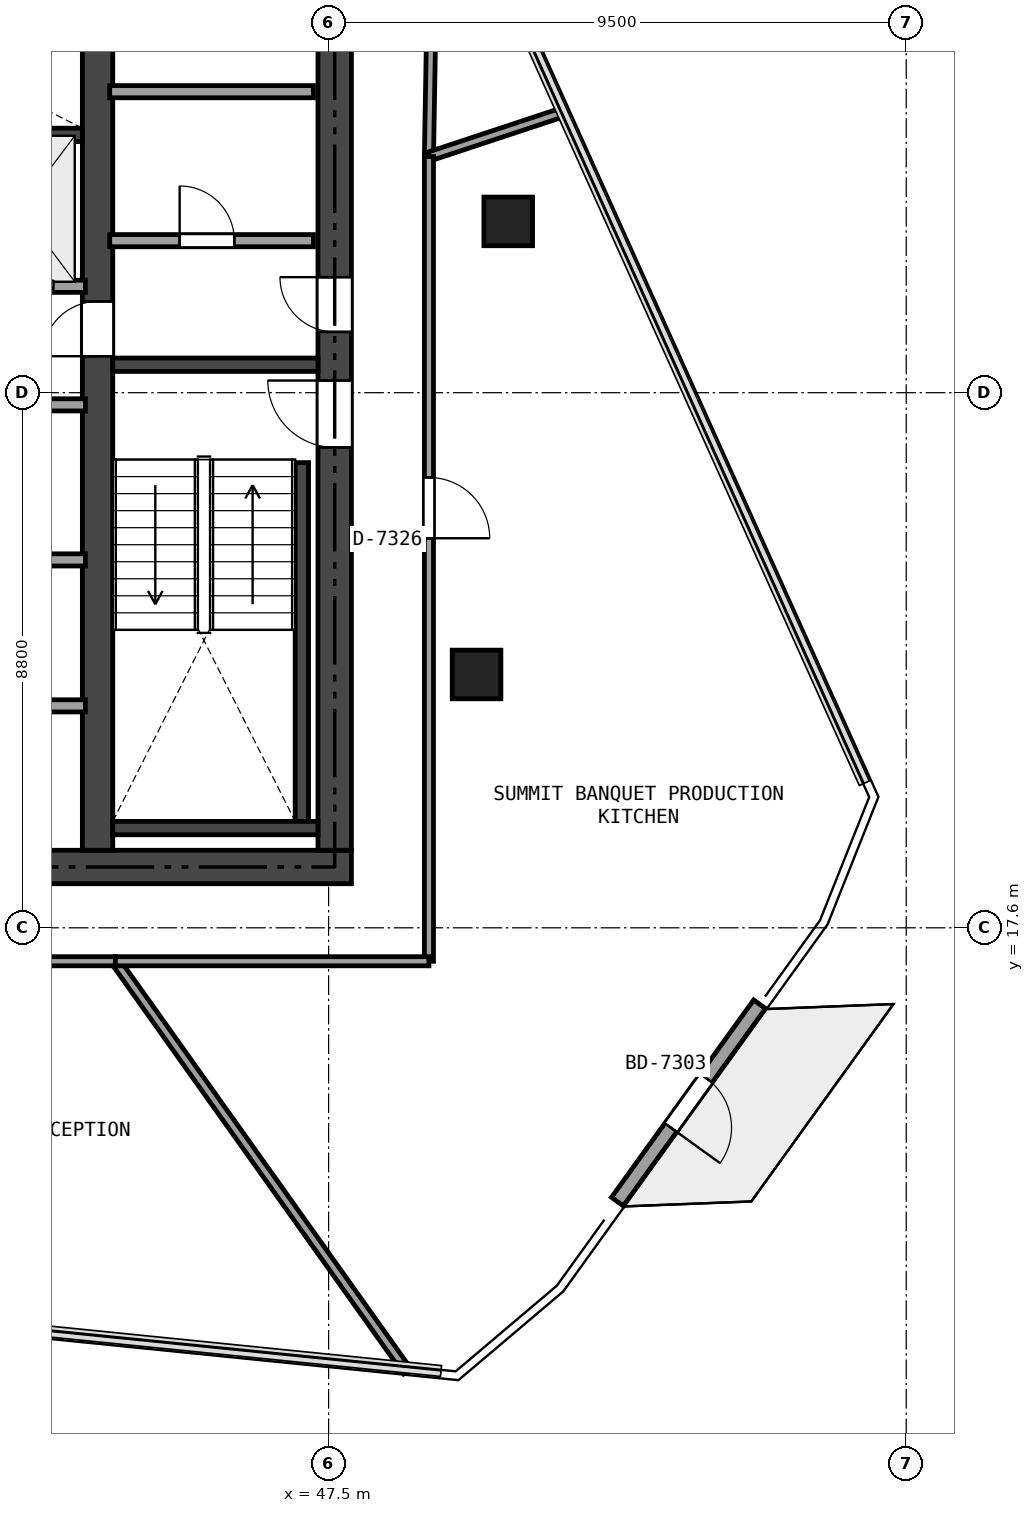
"""IFC4 building model, lengths in metres.
Left out: names, types, materials, properties, quantities, classifications, styles, units other than length and angle.
Written with IfcOpenShell. Run it as: python <this file> out.ifc"""

import sys

from ifc_helpers import new_model, si_unit, direction, frame, frame_2d, origin, origin_2d, place, context, subcontext, project, spatial, rectangle, extrude, element, fill, save


model = new_model("IFC4")
c1 = context("Model", 3, precision=1e-05, world=origin(), true_north=direction((0.0, 1.0)))
c2 = subcontext(c1, "Body", "Model", "MODEL_VIEW")
j1 = project(units=[si_unit("LENGTHUNIT", "METRE"), si_unit("PLANEANGLEUNIT", "RADIAN")], contexts=[c1])
p1 = place(None, origin())
s1 = spatial("IfcSite", under=j1, at=p1, CompositionType="ELEMENT")
p2 = place(p1, origin())
s2 = spatial("IfcBuilding", under=s1, at=p2, CompositionType="ELEMENT")
p3 = place(p2, frame((0.0, 0.0, 271.5)))
s3 = spatial("IfcBuildingStorey", under=s2, at=p3, CompositionType="ELEMENT", Elevation=271.5)
p4 = place(p3, frame((26.525, 18.6, 0.0), z_axis=(0.0, 0.0, 1.0), x_axis=(1.0, 0.0, 0.0)))
e1 = element("IfcWall", 1, at=p4, inside=s3, PredefinedType="SHEAR", context=c2, shape_type="SweptSolid", body=[
    extrude(rectangle(XDim=21.35, YDim=0.55, at=frame_2d((10.675, 0.0))), origin(), (0.0, 0.0, 1.0), 3.32),
])
p5 = place(p4, frame((12.4, 0.0, 0.0)))
e2 = element("IfcOpeningElement", 2, at=p5, cuts=e1, PredefinedType="OPENING", context=c2, shape_type="SweptSolid", body=[
    extrude(rectangle(XDim=1.15, YDim=2.15, at=frame_2d((0.575, 1.075))), frame((0.0, 0.285, 0.0), z_axis=(0.0, -1.0, 0.0), x_axis=(1.0, 0.0, 0.0)), (0.0, 0.0, 1.0), 0.57),
])
p6 = place(p4, frame((5.225, 0.0, 0.0)))
e3 = element("IfcOpeningElement", 3, at=p6, cuts=e1, PredefinedType="OPENING", context=c2, shape_type="SweptSolid", body=[
    extrude(rectangle(XDim=0.9, YDim=2.1, at=frame_2d((0.45, 1.05))), frame((0.0, 0.285, 0.0), z_axis=(0.0, -1.0, 0.0), x_axis=(1.0, 0.0, 0.0)), (0.0, 0.0, 1.0), 0.57),
])
p7 = place(p3, frame((47.6, 18.875, 0.0), z_axis=(0.0, 0.0, 1.0), x_axis=(0.0, 1.0, 0.0)))
e4 = element("IfcWall", 4, at=p7, inside=s3, PredefinedType="SHEAR", context=c2, shape_type="SweptSolid", body=[
    extrude(rectangle(XDim=15.05, YDim=0.55, at=frame_2d((7.525, 0.0))), origin(), (0.0, 0.0, 1.0), 3.32),
])
p8 = place(p7, frame((6.625, 0.0, 0.0)))
e5 = element("IfcOpeningElement", 5, at=p8, cuts=e4, PredefinedType="OPENING", context=c2, shape_type="SweptSolid", body=[
    extrude(rectangle(XDim=1.1, YDim=2.15, at=frame_2d((0.55, 1.075))), frame((0.0, 0.285, 0.0), z_axis=(0.0, -1.0, 0.0), x_axis=(1.0, 0.0, 0.0)), (0.0, 0.0, 1.0), 0.57),
])
p9 = place(p7, frame((8.525, 0.0, 0.0)))
e6 = element("IfcOpeningElement", 6, at=p9, cuts=e4, PredefinedType="OPENING", context=c2, shape_type="SweptSolid", body=[
    extrude(rectangle(XDim=0.9, YDim=2.1, at=frame_2d((0.45, 1.05))), frame((0.0, 0.285, 0.0), z_axis=(0.0, -1.0, 0.0), x_axis=(1.0, 0.0, 0.0)), (0.0, 0.0, 1.0), 0.57),
])
p10 = place(p7, frame((13.175, 0.0, 0.0)))
e7 = element("IfcOpeningElement", 7, at=p10, cuts=e4, PredefinedType="OPENING", context=c2, shape_type="SweptSolid", body=[
    extrude(rectangle(XDim=0.9, YDim=2.1, at=frame_2d((0.45, 1.05))), frame((0.0, 0.285, 0.0), z_axis=(0.0, -1.0, 0.0), x_axis=(1.0, 0.0, 0.0)), (0.0, 0.0, 1.0), 0.57),
])
p11 = place(p3, frame((43.7, 18.875, 0.0), z_axis=(0.0, 0.0, 1.0), x_axis=(0.0, 1.0, 0.0)))
e8 = element("IfcWall", 8, at=p11, inside=s3, PredefinedType="SHEAR", context=c2, shape_type="SweptSolid", body=[
    extrude(rectangle(XDim=15.05, YDim=0.5, at=frame_2d((7.525, 0.0))), origin(), (0.0, 0.0, 1.0), 3.32),
])
p12 = place(p11, frame((8.125, 0.0, 0.0)))
e9 = element("IfcOpeningElement", 9, at=p12, cuts=e8, PredefinedType="OPENING", context=c2, shape_type="SweptSolid", body=[
    extrude(rectangle(XDim=0.9, YDim=2.1, at=frame_2d((0.45, 1.05))), frame((0.0, 0.26, 0.0), z_axis=(0.0, -1.0, 0.0), x_axis=(1.0, 0.0, 0.0)), (0.0, 0.0, 1.0), 0.52),
])
p13 = place(p3, frame((43.95, 26.86, 0.0), z_axis=(0.0, 0.0, 1.0), x_axis=(1.0, 0.0, 0.0)))
e10 = element("IfcWall", 10, at=p13, inside=s3, PredefinedType="SHEAR", context=c2, shape_type="SweptSolid", body=[
    extrude(rectangle(XDim=3.375, YDim=0.22, at=frame_2d((1.688, 0.0))), origin(), (0.0, 0.0, 1.0), 3.32),
])
p14 = place(p3, frame((47.06, 19.35, 0.0), z_axis=(0.0, 0.0, 1.0), x_axis=(0.0, 1.0, 0.0)))
e11 = element("IfcWall", 11, at=p14, inside=s3, PredefinedType="SHEAR", context=c2, shape_type="SweptSolid", body=[
    extrude(rectangle(XDim=5.9, YDim=0.22, at=frame_2d((2.95, 0.0))), origin(), (0.0, 0.0, 1.0), 3.32),
])
p15 = place(p3, frame((43.95, 19.24, 0.0), z_axis=(0.0, 0.0, 1.0), x_axis=(1.0, 0.0, 0.0)))
e12 = element("IfcWall", 12, at=p15, inside=s3, PredefinedType="SHEAR", context=c2, shape_type="SweptSolid", body=[
    extrude(rectangle(XDim=3.375, YDim=0.22, at=frame_2d((1.688, 0.0))), origin(), (0.0, 0.0, 1.0), 3.32),
])
p16 = place(p3, frame((35.84, 30.64, 0.0), z_axis=(0.0, 0.0, 1.0), x_axis=(1.0, 0.0, 0.0)))
e13 = element("IfcWall", 13, at=p16, inside=s3, PredefinedType="SHEAR", context=c2, shape_type="SweptSolid", body=[
    extrude(rectangle(XDim=7.61, YDim=0.22, at=frame_2d((3.805, 0.0))), origin(), (0.0, 0.0, 1.0), 3.32),
])
for number, where, z_axis, x_axis in (
    (14, (50.454, 29.217, 0.0), (0.0, 0.0, 1.0), (1.0, 0.0, 0.0)),
    (15, (49.933, 21.766, 0.0), (0.0, 0.0, 1.0), (1.0, 0.0, 0.0)),
):
    element("IfcColumn", number, at=place(p3, frame(where, z_axis=z_axis, x_axis=x_axis)), inside=s3, PredefinedType="COLUMN", context=c2, shape_type="SweptSolid", body=[
        extrude(rectangle(XDim=0.8, YDim=0.8, at=origin_2d()), origin(), (0.0, 0.0, 1.0), 3.32),
    ])
p17 = place(p3, frame((54.588, 16.343, 0.0), z_axis=(0.0, 0.0, 1.0), x_axis=(-0.584420476985, -0.811450988095, 0.0)))
e16 = element("IfcWall", 16, at=p17, inside=s3, PredefinedType="SOLIDWALL", context=c2, shape_type="SweptSolid", body=[
    extrude(rectangle(XDim=4.0, YDim=0.24, at=frame_2d((2.0, 0.0))), origin(), (0.0, 0.0, 1.0), 3.32),
])
p18 = place(p17, frame((1.5, 0.0, 0.0)))
e17 = element("IfcOpeningElement", 17, at=p18, cuts=e16, PredefinedType="OPENING", context=c2, shape_type="SweptSolid", body=[
    extrude(rectangle(XDim=1.0, YDim=2.15, at=frame_2d((0.5, 1.075))), frame((0.0, 0.13, 0.0), z_axis=(0.0, -1.0, 0.0), x_axis=(1.0, 0.0, 0.0)), (0.0, 0.0, 1.0), 0.26),
])
p19 = place(p3, frame((43.9, 28.9, 0.0), z_axis=(0.0, 0.0, 1.0), x_axis=(1.0, 0.0, 0.0)))
e18 = element("IfcWall", 18, at=p19, inside=s3, PredefinedType="SOLIDWALL", context=c2, shape_type="SweptSolid", body=[
    extrude(rectangle(XDim=3.35, YDim=0.2, at=frame_2d((1.675, 0.0))), origin(), (0.0, 0.0, 1.0), 3.32),
])
p20 = place(p19, frame((1.15, 0.0, 0.0)))
e19 = element("IfcOpeningElement", 19, at=p20, cuts=e18, PredefinedType="OPENING", context=c2, shape_type="SweptSolid", body=[
    extrude(rectangle(XDim=0.9, YDim=2.1, at=frame_2d((0.45, 1.05))), frame((0.0, 0.11, 0.0), z_axis=(0.0, -1.0, 0.0), x_axis=(1.0, 0.0, 0.0)), (0.0, 0.0, 1.0), 0.22),
])
p21 = place(p3, frame((43.9, 31.35, 0.0), z_axis=(0.0, 0.0, 1.0), x_axis=(1.0, 0.0, 0.0)))
e20 = element("IfcWall", 20, at=p21, inside=s3, PredefinedType="SOLIDWALL", context=c2, shape_type="SweptSolid", body=[
    extrude(rectangle(XDim=3.35, YDim=0.2, at=frame_2d((1.675, 0.0))), origin(), (0.0, 0.0, 1.0), 2.993),
])
p22 = place(p3, frame((35.62, 28.15, 0.0), z_axis=(0.0, 0.0, 1.0), x_axis=(1.0, 0.0, 0.0)))
e21 = element("IfcWall", 21, at=p22, inside=s3, PredefinedType="SOLIDWALL", context=c2, shape_type="SweptSolid", body=[
    extrude(rectangle(XDim=7.88, YDim=0.2, at=frame_2d((3.94, 0.0))), origin(), (0.0, 0.0, 1.0), 3.32),
])
p23 = place(p22, frame((0.405, 0.0, 0.0)))
e22 = element("IfcOpeningElement", 22, at=p23, cuts=e21, PredefinedType="OPENING", context=c2, shape_type="SweptSolid", body=[
    extrude(rectangle(XDim=1.1, YDim=2.15, at=frame_2d((0.55, 1.075))), frame((0.0, 0.11, 0.0), z_axis=(0.0, -1.0, 0.0), x_axis=(1.0, 0.0, 0.0)), (0.0, 0.0, 1.0), 0.22),
])
p24 = place(p22, frame((2.355, 0.0, 0.0)))
e23 = element("IfcOpeningElement", 23, at=p24, cuts=e21, PredefinedType="OPENING", context=c2, shape_type="SweptSolid", body=[
    extrude(rectangle(XDim=1.1, YDim=2.15, at=frame_2d((0.55, 1.075))), frame((0.0, 0.11, 0.0), z_axis=(0.0, -1.0, 0.0), x_axis=(1.0, 0.0, 0.0)), (0.0, 0.0, 1.0), 0.22),
])
p25 = place(p22, frame((4.305, 0.0, 0.0)))
e24 = element("IfcOpeningElement", 24, at=p25, cuts=e21, PredefinedType="OPENING", context=c2, shape_type="SweptSolid", body=[
    extrude(rectangle(XDim=1.1, YDim=2.15, at=frame_2d((0.55, 1.075))), frame((0.0, 0.11, 0.0), z_axis=(0.0, -1.0, 0.0), x_axis=(1.0, 0.0, 0.0)), (0.0, 0.0, 1.0), 0.22),
])
p26 = place(p22, frame((6.255, 0.0, 0.0)))
e25 = element("IfcOpeningElement", 25, at=p26, cuts=e21, PredefinedType="OPENING", context=c2, shape_type="SweptSolid", body=[
    extrude(rectangle(XDim=1.1, YDim=2.15, at=frame_2d((0.55, 1.075))), frame((0.0, 0.11, 0.0), z_axis=(0.0, -1.0, 0.0), x_axis=(1.0, 0.0, 0.0)), (0.0, 0.0, 1.0), 0.22),
])
p27 = place(p3, frame((35.62, 26.2, 0.0), z_axis=(0.0, 0.0, 1.0), x_axis=(1.0, 0.0, 0.0)))
e26 = element("IfcWall", 26, at=p27, inside=s3, PredefinedType="SOLIDWALL", context=c2, shape_type="SweptSolid", body=[
    extrude(rectangle(XDim=7.88, YDim=0.2, at=frame_2d((3.94, 0.0))), origin(), (0.0, 0.0, 1.0), 3.32),
])
p28 = place(p27, frame((1.13, 0.0, 0.0)))
e27 = element("IfcOpeningElement", 27, at=p28, cuts=e26, PredefinedType="OPENING", context=c2, shape_type="SweptSolid", body=[
    extrude(rectangle(XDim=0.9, YDim=2.1, at=frame_2d((0.45, 1.05))), frame((0.0, 0.11, 0.0), z_axis=(0.0, -1.0, 0.0), x_axis=(1.0, 0.0, 0.0)), (0.0, 0.0, 1.0), 0.22),
])
p29 = place(p27, frame((5.73, 0.0, 0.0)))
e28 = element("IfcOpeningElement", 28, at=p29, cuts=e26, PredefinedType="OPENING", context=c2, shape_type="SweptSolid", body=[
    extrude(rectangle(XDim=0.9, YDim=2.1, at=frame_2d((0.45, 1.05))), frame((0.0, 0.11, 0.0), z_axis=(0.0, -1.0, 0.0), x_axis=(1.0, 0.0, 0.0)), (0.0, 0.0, 1.0), 0.22),
])
p30 = place(p3, frame((35.62, 23.65, 0.0), z_axis=(0.0, 0.0, 1.0), x_axis=(1.0, 0.0, 0.0)))
e29 = element("IfcWall", 29, at=p30, inside=s3, PredefinedType="SOLIDWALL", context=c2, shape_type="SweptSolid", body=[
    extrude(rectangle(XDim=7.88, YDim=0.2, at=frame_2d((3.94, 0.0))), origin(), (0.0, 0.0, 1.0), 2.841),
])
p31 = place(p3, frame((35.62, 21.25, 0.0), z_axis=(0.0, 0.0, 1.0), x_axis=(1.0, 0.0, 0.0)))
e30 = element("IfcWall", 30, at=p31, inside=s3, PredefinedType="SOLIDWALL", context=c2, shape_type="SweptSolid", body=[
    extrude(rectangle(XDim=7.88, YDim=0.2, at=frame_2d((3.94, 0.0))), origin(), (0.0, 0.0, 1.0), 3.32),
])
p32 = place(p31, frame((1.13, 0.0, 0.0)))
e31 = element("IfcOpeningElement", 31, at=p32, cuts=e30, PredefinedType="OPENING", context=c2, shape_type="SweptSolid", body=[
    extrude(rectangle(XDim=0.9, YDim=2.1, at=frame_2d((0.45, 1.05))), frame((0.0, 0.11, 0.0), z_axis=(0.0, -1.0, 0.0), x_axis=(1.0, 0.0, 0.0)), (0.0, 0.0, 1.0), 0.22),
])
p33 = place(p31, frame((5.73, 0.0, 0.0)))
e32 = element("IfcOpeningElement", 32, at=p33, cuts=e30, PredefinedType="OPENING", context=c2, shape_type="SweptSolid", body=[
    extrude(rectangle(XDim=0.9, YDim=2.1, at=frame_2d((0.45, 1.05))), frame((0.0, 0.11, 0.0), z_axis=(0.0, -1.0, 0.0), x_axis=(1.0, 0.0, 0.0)), (0.0, 0.0, 1.0), 0.22),
])
p34 = place(p3, frame((49.245, 35.772, 0.0), z_axis=(0.0, 0.0, 1.0), x_axis=(-0.017343830358, -0.999849584462, 0.0)))
e33 = element("IfcWall", 33, at=p34, inside=s3, PredefinedType="PARTITIONING", context=c2, shape_type="SweptSolid", body=[
    extrude(rectangle(XDim=5.49, YDim=0.15, at=frame_2d((2.745, 0.0))), origin(), (0.0, 0.0, 1.0), 2.845),
])
p35 = place(p3, frame((49.15, 30.283, 0.0), z_axis=(0.0, 0.0, 1.0), x_axis=(0.949448945232, 0.313921487634, 0.0)))
e34 = element("IfcWall", 34, at=p35, inside=s3, PredefinedType="PARTITIONING", context=c2, shape_type="SweptSolid", body=[
    extrude(rectangle(XDim=2.351, YDim=0.15, at=frame_2d((1.176, 0.0))), origin(), (0.0, 0.0, 1.0), 2.845),
])
p36 = place(p3, frame((48.794, 10.306, 0.0), z_axis=(0.0, 0.0, 1.0), x_axis=(-0.579940250293, 0.814659012158, 0.0)))
e35 = element("IfcWall", 35, at=p36, inside=s3, PredefinedType="PARTITIONING", context=c2, shape_type="SweptSolid", body=[
    extrude(rectangle(XDim=8.279, YDim=0.15, at=frame_2d((4.139, 0.0))), origin(), (0.0, 0.0, 1.0), 2.845),
])
p37 = place(p3, frame((43.993, 17.05, 0.0), z_axis=(0.0, 0.0, 1.0), x_axis=(-1.0, 0.0, 0.0)))
e36 = element("IfcWall", 36, at=p37, inside=s3, PredefinedType="PARTITIONING", context=c2, shape_type="SweptSolid", body=[
    extrude(rectangle(XDim=13.586, YDim=0.15, at=frame_2d((6.793, 0.0))), origin(), (0.0, 0.0, 1.0), 2.769),
])
p38 = place(p37, frame((6.293, 0.0, 0.0)))
e37 = element("IfcOpeningElement", 37, at=p38, cuts=e36, PredefinedType="OPENING", context=c2, shape_type="SweptSolid", body=[
    extrude(rectangle(XDim=1.0, YDim=2.15, at=frame_2d((0.5, 1.075))), frame((0.0, 0.085, 0.0), z_axis=(0.0, -1.0, 0.0), x_axis=(1.0, 0.0, 0.0)), (0.0, 0.0, 1.0), 0.17),
])
p39 = place(p3, frame((49.15, 30.283, 0.0), z_axis=(0.0, 0.0, 1.0), x_axis=(0.0, -1.0, 0.0)))
e38 = element("IfcWall", 38, at=p39, inside=s3, PredefinedType="PARTITIONING", context=c2, shape_type="SweptSolid", body=[
    extrude(rectangle(XDim=13.233, YDim=0.15, at=frame_2d((6.616, 0.0))), origin(), (0.0, 0.0, 1.0), 2.769),
])
p40 = place(p39, frame((5.277, 0.0, 0.0)))
e39 = element("IfcOpeningElement", 39, at=p40, cuts=e38, PredefinedType="OPENING", context=c2, shape_type="SweptSolid", body=[
    extrude(rectangle(XDim=1.0, YDim=2.15, at=frame_2d((0.5, 1.075))), frame((0.0, 0.085, 0.0), z_axis=(0.0, -1.0, 0.0), x_axis=(1.0, 0.0, 0.0)), (0.0, 0.0, 1.0), 0.17),
])
p41 = place(p3, frame((49.15, 17.05, 0.0), z_axis=(0.0, 0.0, 1.0), x_axis=(-1.0, 0.0, 0.0)))
e40 = element("IfcWall", 40, at=p41, inside=s3, PredefinedType="PARTITIONING", context=c2, shape_type="SweptSolid", body=[
    extrude(rectangle(XDim=5.157, YDim=0.15, at=frame_2d((2.579, 0.0))), origin(), (0.0, 0.0, 1.0), 2.845),
])
p42 = place(p18, origin())
e41 = element("IfcDoor", 41, at=p42, inside=s3, OperationType="SINGLE_SWING_RIGHT", PredefinedType="DOOR", context=c2, shape_type="SweptSolid", body=[
    extrude(rectangle(XDim=1.0, YDim=2.15, at=frame_2d((0.5, 1.075))), frame((0.0, 0.025, 0.0), z_axis=(0.0, -1.0, 0.0), x_axis=(1.0, 0.0, 0.0)), (0.0, 0.0, 1.0), 0.05),
])
fill(e17, e41)
p43 = place(p8, origin())
e42 = element("IfcDoor", 42, at=p43, inside=s3, OperationType="SINGLE_SWING_RIGHT", PredefinedType="DOOR", context=c2, shape_type="SweptSolid", body=[
    extrude(rectangle(XDim=1.1, YDim=2.15, at=frame_2d((0.55, 1.075))), frame((0.0, 0.025, 0.0), z_axis=(0.0, -1.0, 0.0), x_axis=(1.0, 0.0, 0.0)), (0.0, 0.0, 1.0), 0.05),
])
fill(e5, e42)
p44 = place(p12, origin())
e43 = element("IfcDoor", 43, at=p44, inside=s3, OperationType="SINGLE_SWING_LEFT", PredefinedType="DOOR", context=c2, shape_type="SweptSolid", body=[
    extrude(rectangle(XDim=0.9, YDim=2.1, at=frame_2d((0.45, 1.05))), frame((0.0, 0.025, 0.0), z_axis=(0.0, -1.0, 0.0), x_axis=(1.0, 0.0, 0.0)), (0.0, 0.0, 1.0), 0.05),
])
fill(e9, e43)
p45 = place(p9, origin())
e44 = element("IfcDoor", 44, at=p45, inside=s3, OperationType="SINGLE_SWING_RIGHT", PredefinedType="DOOR", context=c2, shape_type="SweptSolid", body=[
    extrude(rectangle(XDim=0.9, YDim=2.1, at=frame_2d((0.45, 1.05))), frame((0.0, 0.025, 0.0), z_axis=(0.0, -1.0, 0.0), x_axis=(1.0, 0.0, 0.0)), (0.0, 0.0, 1.0), 0.05),
])
fill(e6, e44)
p46 = place(p20, origin())
e45 = element("IfcDoor", 45, at=p46, inside=s3, OperationType="SINGLE_SWING_LEFT", PredefinedType="DOOR", context=c2, shape_type="SweptSolid", body=[
    extrude(rectangle(XDim=0.9, YDim=2.1, at=frame_2d((0.45, 1.05))), frame((0.0, 0.025, 0.0), z_axis=(0.0, -1.0, 0.0), x_axis=(1.0, 0.0, 0.0)), (0.0, 0.0, 1.0), 0.05),
])
fill(e19, e45)
p47 = place(p26, origin())
e46 = element("IfcDoor", 46, at=p47, inside=s3, OperationType="SLIDING_TO_LEFT", PredefinedType="DOOR", context=c2, shape_type="SweptSolid", body=[
    extrude(rectangle(XDim=1.1, YDim=2.15, at=frame_2d((0.55, 1.075))), frame((0.0, 0.025, 0.0), z_axis=(0.0, -1.0, 0.0), x_axis=(1.0, 0.0, 0.0)), (0.0, 0.0, 1.0), 0.05),
])
fill(e25, e46)
p48 = place(p40, origin())
e47 = element("IfcDoor", 47, at=p48, inside=s3, OperationType="SINGLE_SWING_RIGHT", PredefinedType="DOOR", context=c2, shape_type="SweptSolid", body=[
    extrude(rectangle(XDim=1.0, YDim=2.15, at=frame_2d((0.5, 1.075))), frame((0.0, 0.025, 0.0), z_axis=(0.0, -1.0, 0.0), x_axis=(1.0, 0.0, 0.0)), (0.0, 0.0, 1.0), 0.05),
])
fill(e39, e47)
save(model, sys.argv[1])
